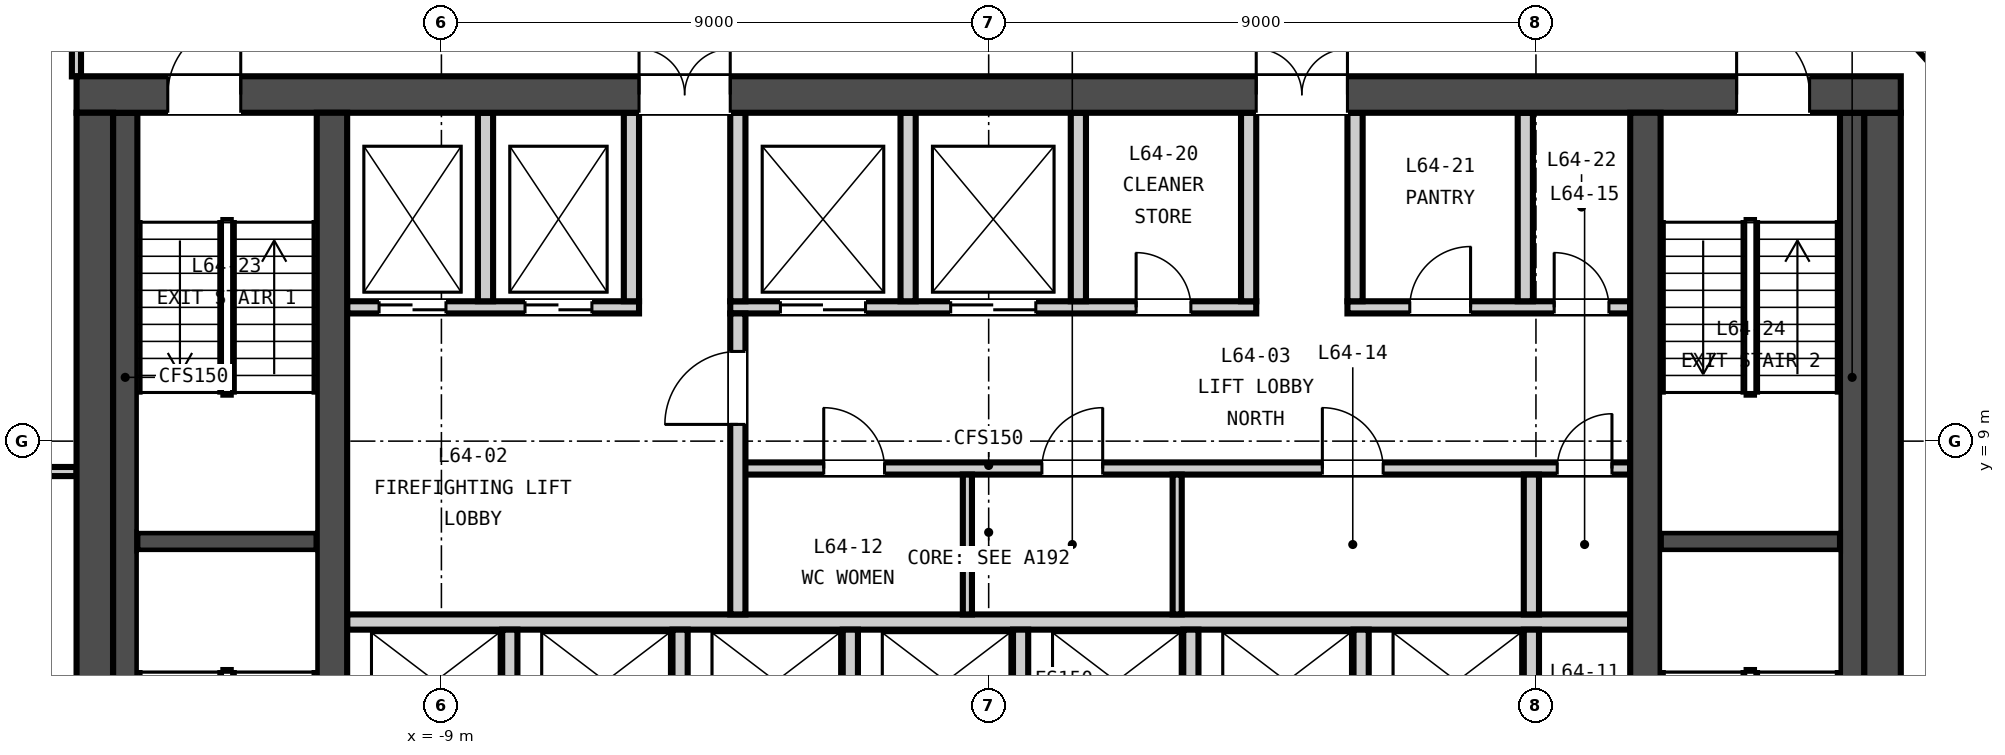
"""IFC4 building model, lengths in metres.
Left out: names, types, materials, properties, quantities, classifications, styles, units other than length and angle.
Written with IfcOpenShell. Run it as: python <this file> out.ifc"""

import sys

from ifc_helpers import new_model, si_unit, direction, frame, frame_2d, origin, place, context, subcontext, project, spatial, rectangle, extrude, element, fill, save


model = new_model("IFC4")
c1 = context("Model", 3, precision=1e-05, world=origin(), true_north=direction((0.0, 1.0)))
c2 = subcontext(c1, "Body", "Model", "MODEL_VIEW")
j1 = project(units=[si_unit("LENGTHUNIT", "METRE"), si_unit("PLANEANGLEUNIT", "RADIAN")], contexts=[c1])
p1 = place(None, origin())
s1 = spatial("IfcSite", under=j1, at=p1, CompositionType="ELEMENT")
p2 = place(p1, origin())
s2 = spatial("IfcBuilding", under=s1, at=p2, CompositionType="ELEMENT")
p3 = place(p2, frame((0.0, 0.0, 252.8)))
s3 = spatial("IfcBuildingStorey", under=s2, at=p3, CompositionType="ELEMENT", Elevation=252.8)
p4 = place(p3, frame((-15.0, 14.7, -0.15), z_axis=(0.0, 0.0, 1.0), x_axis=(1.0, 0.0, 0.0)))
e1 = element("IfcWall", 1, at=p4, inside=s3, PredefinedType="SOLIDWALL", context=c2, shape_type="SweptSolid", body=[
    extrude(rectangle(XDim=30.0, YDim=0.6, at=frame_2d((15.0, 0.0))), origin(), (0.0, 0.0, 1.0), 3.5),
])
p5 = place(p4, frame((9.25, 0.0, 0.15)))
e2 = element("IfcOpeningElement", 2, at=p5, cuts=e1, PredefinedType="OPENING", context=c2, shape_type="SweptSolid", body=[
    extrude(rectangle(XDim=1.5, YDim=2.1, at=frame_2d((0.75, 1.05))), frame((0.0, 0.31, 0.0), z_axis=(0.0, -1.0, 0.0), x_axis=(1.0, 0.0, 0.0)), (0.0, 0.0, 1.0), 0.62),
])
p6 = place(p4, frame((19.4, 0.0, 0.15)))
e3 = element("IfcOpeningElement", 3, at=p6, cuts=e1, PredefinedType="OPENING", context=c2, shape_type="SweptSolid", body=[
    extrude(rectangle(XDim=1.5, YDim=2.1, at=frame_2d((0.75, 1.05))), frame((0.0, 0.31, 0.0), z_axis=(0.0, -1.0, 0.0), x_axis=(1.0, 0.0, 0.0)), (0.0, 0.0, 1.0), 0.62),
])
p7 = place(p4, frame((1.5, 0.0, 0.15)))
e4 = element("IfcOpeningElement", 4, at=p7, cuts=e1, PredefinedType="OPENING", context=c2, shape_type="SweptSolid", body=[
    extrude(rectangle(XDim=1.2, YDim=2.1, at=frame_2d((0.6, 1.05))), frame((0.0, 0.31, 0.0), z_axis=(0.0, -1.0, 0.0), x_axis=(1.0, 0.0, 0.0)), (0.0, 0.0, 1.0), 0.62),
])
p8 = place(p4, frame((27.3, 0.0, 0.15)))
e5 = element("IfcOpeningElement", 5, at=p8, cuts=e1, PredefinedType="OPENING", context=c2, shape_type="SweptSolid", body=[
    extrude(rectangle(XDim=1.2, YDim=2.1, at=frame_2d((0.6, 1.05))), frame((0.0, 0.31, 0.0), z_axis=(0.0, -1.0, 0.0), x_axis=(1.0, 0.0, 0.0)), (0.0, 0.0, 1.0), 0.62),
])
for number, where, z_axis, x_axis in (
    (6, (-14.7, 0.6, -0.15), (0.0, 0.0, 1.0), (0.0, 1.0, 0.0)),
    (7, (14.7, 0.6, -0.15), (0.0, 0.0, 1.0), (0.0, 1.0, 0.0)),
):
    element("IfcWall", number, at=place(p3, frame(where, z_axis=z_axis, x_axis=x_axis)), inside=s3, PredefinedType="SOLIDWALL", context=c2, shape_type="SweptSolid", body=[
        extrude(rectangle(XDim=13.8, YDim=0.6, at=frame_2d((6.9, 0.0))), origin(), (0.0, 0.0, 1.0), 3.5),
    ])
for number, where, z_axis, x_axis in (
    (8, (-10.8, 0.6, -0.15), (0.0, 0.0, 1.0), (0.0, 1.0, 0.0)),
    (9, (10.8, 0.6, -0.15), (0.0, 0.0, 1.0), (0.0, 1.0, 0.0)),
):
    element("IfcWall", number, at=place(p3, frame(where, z_axis=z_axis, x_axis=x_axis)), inside=s3, PredefinedType="SOLIDWALL", context=c2, shape_type="SweptSolid", body=[
        extrude(rectangle(XDim=13.8, YDim=0.5, at=frame_2d((6.9, 0.0))), origin(), (0.0, 0.0, 1.0), 3.5),
    ])
p9 = place(p3, frame((-10.55, 6.025, 0.0), z_axis=(0.0, 0.0, 1.0), x_axis=(1.0, 0.0, 0.0)))
e10 = element("IfcWall", 10, at=p9, inside=s3, PredefinedType="PARTITIONING", context=c2, shape_type="SweptSolid", body=[
    extrude(rectangle(XDim=21.1, YDim=0.25, at=frame_2d((10.55, 0.0))), origin(), (0.0, 0.0, 1.0), 3.35),
])
p10 = place(p3, frame((-4.125, 8.55, 0.0), z_axis=(0.0, 0.0, 1.0), x_axis=(1.0, 0.0, 0.0)))
e11 = element("IfcWall", 11, at=p10, inside=s3, PredefinedType="PARTITIONING", context=c2, shape_type="SweptSolid", body=[
    extrude(rectangle(XDim=14.675, YDim=0.2, at=frame_2d((7.337, 0.0))), origin(), (0.0, 0.0, 1.0), 3.35),
])
p11 = place(p10, frame((1.413, 0.0, 0.0)))
e12 = element("IfcOpeningElement", 12, at=p11, cuts=e11, PredefinedType="OPENING", context=c2, shape_type="SweptSolid", body=[
    extrude(rectangle(XDim=1.0, YDim=2.1, at=frame_2d((0.5, 1.05))), frame((0.0, 0.11, 0.0), z_axis=(0.0, -1.0, 0.0), x_axis=(1.0, 0.0, 0.0)), (0.0, 0.0, 1.0), 0.22),
])
p12 = place(p10, frame((5.0, 0.0, 0.0)))
e13 = element("IfcOpeningElement", 13, at=p12, cuts=e11, PredefinedType="OPENING", context=c2, shape_type="SweptSolid", body=[
    extrude(rectangle(XDim=1.0, YDim=2.1, at=frame_2d((0.5, 1.05))), frame((0.0, 0.11, 0.0), z_axis=(0.0, -1.0, 0.0), x_axis=(1.0, 0.0, 0.0)), (0.0, 0.0, 1.0), 0.22),
])
p13 = place(p10, frame((9.613, 0.0, 0.0)))
e14 = element("IfcOpeningElement", 14, at=p13, cuts=e11, PredefinedType="OPENING", context=c2, shape_type="SweptSolid", body=[
    extrude(rectangle(XDim=1.0, YDim=2.1, at=frame_2d((0.5, 1.05))), frame((0.0, 0.11, 0.0), z_axis=(0.0, -1.0, 0.0), x_axis=(1.0, 0.0, 0.0)), (0.0, 0.0, 1.0), 0.22),
])
p14 = place(p10, frame((13.475, 0.0, 0.0)))
e15 = element("IfcOpeningElement", 15, at=p14, cuts=e11, PredefinedType="OPENING", context=c2, shape_type="SweptSolid", body=[
    extrude(rectangle(XDim=0.9, YDim=2.1, at=frame_2d((0.45, 1.05))), frame((0.0, 0.11, 0.0), z_axis=(0.0, -1.0, 0.0), x_axis=(1.0, 0.0, 0.0)), (0.0, 0.0, 1.0), 0.22),
])
p15 = place(p3, frame((-10.55, 11.2, 0.0), z_axis=(0.0, 0.0, 1.0), x_axis=(1.0, 0.0, 0.0)))
e16 = element("IfcWall", 16, at=p15, inside=s3, PredefinedType="PARTITIONING", context=c2, shape_type="SweptSolid", body=[
    extrude(rectangle(XDim=4.8, YDim=0.2, at=frame_2d((2.4, 0.0))), origin(), (0.0, 0.0, 1.0), 3.35),
])
p16 = place(p15, frame((0.525, 0.0, 0.0)))
e17 = element("IfcOpeningElement", 17, at=p16, cuts=e16, PredefinedType="OPENING", context=c2, shape_type="SweptSolid", body=[
    extrude(rectangle(XDim=1.1, YDim=2.1, at=frame_2d((0.55, 1.05))), frame((0.0, 0.11, 0.0), z_axis=(0.0, -1.0, 0.0), x_axis=(1.0, 0.0, 0.0)), (0.0, 0.0, 1.0), 0.22),
])
p17 = place(p15, frame((2.925, 0.0, 0.0)))
e18 = element("IfcOpeningElement", 18, at=p17, cuts=e16, PredefinedType="OPENING", context=c2, shape_type="SweptSolid", body=[
    extrude(rectangle(XDim=1.1, YDim=2.1, at=frame_2d((0.55, 1.05))), frame((0.0, 0.11, 0.0), z_axis=(0.0, -1.0, 0.0), x_axis=(1.0, 0.0, 0.0)), (0.0, 0.0, 1.0), 0.22),
])
p18 = place(p3, frame((-4.25, 11.2, 0.0), z_axis=(0.0, 0.0, 1.0), x_axis=(1.0, 0.0, 0.0)))
e19 = element("IfcWall", 19, at=p18, inside=s3, PredefinedType="PARTITIONING", context=c2, shape_type="SweptSolid", body=[
    extrude(rectangle(XDim=8.65, YDim=0.2, at=frame_2d((4.325, 0.0))), origin(), (0.0, 0.0, 1.0), 3.35),
])
p19 = place(p18, frame((0.825, 0.0, 0.0)))
e20 = element("IfcOpeningElement", 20, at=p19, cuts=e19, PredefinedType="OPENING", context=c2, shape_type="SweptSolid", body=[
    extrude(rectangle(XDim=1.4, YDim=2.1, at=frame_2d((0.7, 1.05))), frame((0.0, 0.11, 0.0), z_axis=(0.0, -1.0, 0.0), x_axis=(1.0, 0.0, 0.0)), (0.0, 0.0, 1.0), 0.22),
])
p20 = place(p18, frame((3.625, 0.0, 0.0)))
e21 = element("IfcOpeningElement", 21, at=p20, cuts=e19, PredefinedType="OPENING", context=c2, shape_type="SweptSolid", body=[
    extrude(rectangle(XDim=1.4, YDim=2.1, at=frame_2d((0.7, 1.05))), frame((0.0, 0.11, 0.0), z_axis=(0.0, -1.0, 0.0), x_axis=(1.0, 0.0, 0.0)), (0.0, 0.0, 1.0), 0.22),
])
p21 = place(p18, frame((6.675, 0.0, 0.0)))
e22 = element("IfcOpeningElement", 22, at=p21, cuts=e19, PredefinedType="OPENING", context=c2, shape_type="SweptSolid", body=[
    extrude(rectangle(XDim=0.9, YDim=2.1, at=frame_2d((0.45, 1.05))), frame((0.0, 0.11, 0.0), z_axis=(0.0, -1.0, 0.0), x_axis=(1.0, 0.0, 0.0)), (0.0, 0.0, 1.0), 0.22),
])
p22 = place(p3, frame((5.9, 11.2, 0.0), z_axis=(0.0, 0.0, 1.0), x_axis=(1.0, 0.0, 0.0)))
e23 = element("IfcWall", 23, at=p22, inside=s3, PredefinedType="PARTITIONING", context=c2, shape_type="SweptSolid", body=[
    extrude(rectangle(XDim=4.65, YDim=0.2, at=frame_2d((2.325, 0.0))), origin(), (0.0, 0.0, 1.0), 3.35),
])
p23 = place(p22, frame((1.025, 0.0, 0.0)))
e24 = element("IfcOpeningElement", 24, at=p23, cuts=e23, PredefinedType="OPENING", context=c2, shape_type="SweptSolid", body=[
    extrude(rectangle(XDim=1.0, YDim=2.1, at=frame_2d((0.5, 1.05))), frame((0.0, 0.11, 0.0), z_axis=(0.0, -1.0, 0.0), x_axis=(1.0, 0.0, 0.0)), (0.0, 0.0, 1.0), 0.22),
])
p24 = place(p22, frame((3.4, 0.0, 0.0)))
e25 = element("IfcOpeningElement", 25, at=p24, cuts=e23, PredefinedType="OPENING", context=c2, shape_type="SweptSolid", body=[
    extrude(rectangle(XDim=0.9, YDim=2.1, at=frame_2d((0.45, 1.05))), frame((0.0, 0.11, 0.0), z_axis=(0.0, -1.0, 0.0), x_axis=(1.0, 0.0, 0.0)), (0.0, 0.0, 1.0), 0.22),
])
p25 = place(p3, frame((-4.125, 6.15, 0.0), z_axis=(0.0, 0.0, 1.0), x_axis=(0.0, 1.0, 0.0)))
e26 = element("IfcWall", 26, at=p25, inside=s3, PredefinedType="PARTITIONING", context=c2, shape_type="SweptSolid", body=[
    extrude(rectangle(XDim=4.95, YDim=0.25, at=frame_2d((2.475, 0.0))), origin(), (0.0, 0.0, 1.0), 3.35),
])
p26 = place(p25, frame((3.125, 0.0, 0.0)))
e27 = element("IfcOpeningElement", 27, at=p26, cuts=e26, PredefinedType="OPENING", context=c2, shape_type="SweptSolid", body=[
    extrude(rectangle(XDim=1.2, YDim=2.1, at=frame_2d((0.6, 1.05))), frame((0.0, 0.135, 0.0), z_axis=(0.0, -1.0, 0.0), x_axis=(1.0, 0.0, 0.0)), (0.0, 0.0, 1.0), 0.27),
])
for number, where, z_axis, x_axis in (
    (28, (-7.875, 3.6, 0.0), (0.0, 0.0, 1.0), (0.0, 1.0, 0.0)),
    (29, (-5.075, 3.6, 0.0), (0.0, 0.0, 1.0), (0.0, 1.0, 0.0)),
    (30, (-2.275, 3.6, 0.0), (0.0, 0.0, 1.0), (0.0, 1.0, 0.0)),
    (31, (0.525, 3.6, 0.0), (0.0, 0.0, 1.0), (0.0, 1.0, 0.0)),
    (32, (3.325, 3.6, 0.0), (0.0, 0.0, 1.0), (0.0, 1.0, 0.0)),
    (33, (6.125, 3.6, 0.0), (0.0, 0.0, 1.0), (0.0, 1.0, 0.0)),
    (34, (8.925, 3.6, 0.0), (0.0, 0.0, 1.0), (0.0, 1.0, 0.0)),
):
    element("IfcWall", number, at=place(p3, frame(where, z_axis=z_axis, x_axis=x_axis)), inside=s3, PredefinedType="PARTITIONING", context=c2, shape_type="SweptSolid", body=[
        extrude(rectangle(XDim=2.3, YDim=0.25, at=frame_2d((1.15, 0.0))), origin(), (0.0, 0.0, 1.0), 3.35),
    ])
for number, where, z_axis, x_axis in (
    (35, (-0.35, 6.15, 0.0), (0.0, 0.0, 1.0), (0.0, 1.0, 0.0)),
    (36, (3.1, 6.15, 0.0), (0.0, 0.0, 1.0), (0.0, 1.0, 0.0)),
):
    element("IfcWall", number, at=place(p3, frame(where, z_axis=z_axis, x_axis=x_axis)), inside=s3, PredefinedType="PARTITIONING", context=c2, shape_type="SweptSolid", body=[
        extrude(rectangle(XDim=2.3, YDim=0.15, at=frame_2d((1.15, 0.0))), origin(), (0.0, 0.0, 1.0), 3.35),
    ])
p27 = place(p3, frame((8.925, 6.15, 0.0), z_axis=(0.0, 0.0, 1.0), x_axis=(0.0, 1.0, 0.0)))
e37 = element("IfcWall", 37, at=p27, inside=s3, PredefinedType="PARTITIONING", context=c2, shape_type="SweptSolid", body=[
    extrude(rectangle(XDim=2.3, YDim=0.25, at=frame_2d((1.15, 0.0))), origin(), (0.0, 0.0, 1.0), 3.35),
])
for number, where, z_axis, x_axis in (
    (38, (-8.275, 11.3, 0.0), (0.0, 0.0, 1.0), (0.0, 1.0, 0.0)),
    (39, (-5.875, 11.3, 0.0), (0.0, 0.0, 1.0), (0.0, 1.0, 0.0)),
    (40, (-4.125, 11.3, 0.0), (0.0, 0.0, 1.0), (0.0, 1.0, 0.0)),
    (41, (-1.325, 11.3, 0.0), (0.0, 0.0, 1.0), (0.0, 1.0, 0.0)),
    (42, (1.475, 11.3, 0.0), (0.0, 0.0, 1.0), (0.0, 1.0, 0.0)),
    (43, (4.275, 11.3, 0.0), (0.0, 0.0, 1.0), (0.0, 1.0, 0.0)),
    (44, (6.025, 11.3, 0.0), (0.0, 0.0, 1.0), (0.0, 1.0, 0.0)),
    (45, (8.825, 11.3, 0.0), (0.0, 0.0, 1.0), (0.0, 1.0, 0.0)),
):
    element("IfcWall", number, at=place(p3, frame(where, z_axis=z_axis, x_axis=x_axis)), inside=s3, PredefinedType="PARTITIONING", context=c2, shape_type="SweptSolid", body=[
        extrude(rectangle(XDim=3.1, YDim=0.25, at=frame_2d((1.55, 0.0))), origin(), (0.0, 0.0, 1.0), 3.35),
    ])
p28 = place(p3, frame((-14.0, 7.35, 0.0), z_axis=(0.0, 0.0, 1.0), x_axis=(1.0, 0.0, 0.0)))
e46 = element("IfcWall", 46, at=p28, inside=s3, PredefinedType="SOLIDWALL", context=c2, shape_type="SweptSolid", body=[
    extrude(rectangle(XDim=2.95, YDim=0.3, at=frame_2d((1.475, 0.0))), origin(), (0.0, 0.0, 1.0), 3.35),
])
p29 = place(p3, frame((-14.2, 0.6, 0.0), z_axis=(0.0, 0.0, 1.0), x_axis=(0.0, 1.0, 0.0)))
e47 = element("IfcWall", 47, at=p29, inside=s3, PredefinedType="SOLIDWALL", context=c2, shape_type="SweptSolid", body=[
    extrude(rectangle(XDim=13.8, YDim=0.4, at=frame_2d((6.9, 0.0))), origin(), (0.0, 0.0, 1.0), 3.35),
])
p30 = place(p3, frame((11.05, 7.35, 0.0), z_axis=(0.0, 0.0, 1.0), x_axis=(1.0, 0.0, 0.0)))
e48 = element("IfcWall", 48, at=p30, inside=s3, PredefinedType="SOLIDWALL", context=c2, shape_type="SweptSolid", body=[
    extrude(rectangle(XDim=2.95, YDim=0.3, at=frame_2d((1.475, 0.0))), origin(), (0.0, 0.0, 1.0), 3.35),
])
p31 = place(p3, frame((14.2, 0.6, 0.0), z_axis=(0.0, 0.0, 1.0), x_axis=(0.0, 1.0, 0.0)))
e49 = element("IfcWall", 49, at=p31, inside=s3, PredefinedType="SOLIDWALL", context=c2, shape_type="SweptSolid", body=[
    extrude(rectangle(XDim=13.8, YDim=0.4, at=frame_2d((6.9, 0.0))), origin(), (0.0, 0.0, 1.0), 3.35),
])
p32 = place(p3, frame((-15.002, 14.998, 0.0), z_axis=(0.0, 0.0, 1.0), x_axis=(0.000965483499, 0.999999533921, 0.0)))
e50 = element("IfcWall", 50, at=p32, inside=s3, PredefinedType="PARTITIONING", context=c2, shape_type="SweptSolid", body=[
    extrude(rectangle(XDim=2.023, YDim=0.15, at=frame_2d((1.011, 0.0))), origin(), (0.0, 0.0, 1.0), 2.601),
])
p33 = place(p3, frame((-17.125, 8.5, 0.0), z_axis=(0.0, 0.0, 1.0), x_axis=(1.0, 0.0, 0.0)))
e51 = element("IfcWall", 51, at=p33, inside=s3, PredefinedType="PARTITIONING", context=c2, shape_type="SweptSolid", body=[
    extrude(rectangle(XDim=2.125, YDim=0.15, at=frame_2d((1.062, 0.0))), origin(), (0.0, 0.0, 1.0), 2.601),
])
p34 = place(p3, frame((14.476, 16.433, 0.0), z_axis=(0.0, 0.0, 1.0), x_axis=(0.669204384193, -0.743078388985, 0.0)))
e52 = element("IfcWall", 52, at=p34, inside=s3, PredefinedType="PARTITIONING", context=c2, shape_type="SweptSolid", body=[
    extrude(rectangle(XDim=3.996, YDim=0.15, at=frame_2d((1.998, 0.0))), origin(), (0.0, 0.0, 1.0), 2.601),
])
p35 = place(p26, origin())
e53 = element("IfcDoor", 53, at=p35, inside=s3, OperationType="SINGLE_SWING_LEFT", PredefinedType="DOOR", context=c2, shape_type="SweptSolid", body=[
    extrude(rectangle(XDim=1.2, YDim=2.1, at=frame_2d((0.6, 1.05))), frame((0.0, 0.025, 0.0), z_axis=(0.0, -1.0, 0.0), x_axis=(1.0, 0.0, 0.0)), (0.0, 0.0, 1.0), 0.05),
])
fill(e27, e53)
p36 = place(p11, origin())
e54 = element("IfcDoor", 54, at=p36, inside=s3, OperationType="SINGLE_SWING_LEFT", PredefinedType="DOOR", context=c2, shape_type="SweptSolid", body=[
    extrude(rectangle(XDim=1.0, YDim=2.1, at=frame_2d((0.5, 1.05))), frame((0.0, 0.025, 0.0), z_axis=(0.0, -1.0, 0.0), x_axis=(1.0, 0.0, 0.0)), (0.0, 0.0, 1.0), 0.05),
])
fill(e12, e54)
p37 = place(p12, origin())
e55 = element("IfcDoor", 55, at=p37, inside=s3, OperationType="SINGLE_SWING_RIGHT", PredefinedType="DOOR", context=c2, shape_type="SweptSolid", body=[
    extrude(rectangle(XDim=1.0, YDim=2.1, at=frame_2d((0.5, 1.05))), frame((0.0, 0.025, 0.0), z_axis=(0.0, -1.0, 0.0), x_axis=(1.0, 0.0, 0.0)), (0.0, 0.0, 1.0), 0.05),
])
fill(e13, e55)
p38 = place(p13, origin())
e56 = element("IfcDoor", 56, at=p38, inside=s3, OperationType="SINGLE_SWING_LEFT", PredefinedType="DOOR", context=c2, shape_type="SweptSolid", body=[
    extrude(rectangle(XDim=1.0, YDim=2.1, at=frame_2d((0.5, 1.05))), frame((0.0, 0.025, 0.0), z_axis=(0.0, -1.0, 0.0), x_axis=(1.0, 0.0, 0.0)), (0.0, 0.0, 1.0), 0.05),
])
fill(e14, e56)
p39 = place(p14, origin())
e57 = element("IfcDoor", 57, at=p39, inside=s3, OperationType="SINGLE_SWING_RIGHT", PredefinedType="DOOR", context=c2, shape_type="SweptSolid", body=[
    extrude(rectangle(XDim=0.9, YDim=2.1, at=frame_2d((0.45, 1.05))), frame((0.0, 0.025, 0.0), z_axis=(0.0, -1.0, 0.0), x_axis=(1.0, 0.0, 0.0)), (0.0, 0.0, 1.0), 0.05),
])
fill(e15, e57)
p40 = place(p16, origin())
e58 = element("IfcDoor", 58, at=p40, inside=s3, OperationType="DOUBLE_DOOR_SLIDING", PredefinedType="DOOR", context=c2, shape_type="SweptSolid", body=[
    extrude(rectangle(XDim=1.1, YDim=2.1, at=frame_2d((0.55, 1.05))), frame((0.0, 0.025, 0.0), z_axis=(0.0, -1.0, 0.0), x_axis=(1.0, 0.0, 0.0)), (0.0, 0.0, 1.0), 0.05),
])
fill(e17, e58)
p41 = place(p17, origin())
e59 = element("IfcDoor", 59, at=p41, inside=s3, OperationType="DOUBLE_DOOR_SLIDING", PredefinedType="DOOR", context=c2, shape_type="SweptSolid", body=[
    extrude(rectangle(XDim=1.1, YDim=2.1, at=frame_2d((0.55, 1.05))), frame((0.0, 0.025, 0.0), z_axis=(0.0, -1.0, 0.0), x_axis=(1.0, 0.0, 0.0)), (0.0, 0.0, 1.0), 0.05),
])
fill(e18, e59)
p42 = place(p19, origin())
e60 = element("IfcDoor", 60, at=p42, inside=s3, OperationType="DOUBLE_DOOR_SLIDING", PredefinedType="DOOR", context=c2, shape_type="SweptSolid", body=[
    extrude(rectangle(XDim=1.4, YDim=2.1, at=frame_2d((0.7, 1.05))), frame((0.0, 0.025, 0.0), z_axis=(0.0, -1.0, 0.0), x_axis=(1.0, 0.0, 0.0)), (0.0, 0.0, 1.0), 0.05),
])
fill(e20, e60)
p43 = place(p20, origin())
e61 = element("IfcDoor", 61, at=p43, inside=s3, OperationType="DOUBLE_DOOR_SLIDING", PredefinedType="DOOR", context=c2, shape_type="SweptSolid", body=[
    extrude(rectangle(XDim=1.4, YDim=2.1, at=frame_2d((0.7, 1.05))), frame((0.0, 0.025, 0.0), z_axis=(0.0, -1.0, 0.0), x_axis=(1.0, 0.0, 0.0)), (0.0, 0.0, 1.0), 0.05),
])
fill(e21, e61)
p44 = place(p21, origin())
e62 = element("IfcDoor", 62, at=p44, inside=s3, OperationType="SINGLE_SWING_LEFT", PredefinedType="DOOR", context=c2, shape_type="SweptSolid", body=[
    extrude(rectangle(XDim=0.9, YDim=2.1, at=frame_2d((0.45, 1.05))), frame((0.0, 0.025, 0.0), z_axis=(0.0, -1.0, 0.0), x_axis=(1.0, 0.0, 0.0)), (0.0, 0.0, 1.0), 0.05),
])
fill(e22, e62)
p45 = place(p23, origin())
e63 = element("IfcDoor", 63, at=p45, inside=s3, OperationType="SINGLE_SWING_RIGHT", PredefinedType="DOOR", context=c2, shape_type="SweptSolid", body=[
    extrude(rectangle(XDim=1.0, YDim=2.1, at=frame_2d((0.5, 1.05))), frame((0.0, 0.025, 0.0), z_axis=(0.0, -1.0, 0.0), x_axis=(1.0, 0.0, 0.0)), (0.0, 0.0, 1.0), 0.05),
])
fill(e24, e63)
p46 = place(p24, origin())
e64 = element("IfcDoor", 64, at=p46, inside=s3, OperationType="SINGLE_SWING_LEFT", PredefinedType="DOOR", context=c2, shape_type="SweptSolid", body=[
    extrude(rectangle(XDim=0.9, YDim=2.1, at=frame_2d((0.45, 1.05))), frame((0.0, 0.025, 0.0), z_axis=(0.0, -1.0, 0.0), x_axis=(1.0, 0.0, 0.0)), (0.0, 0.0, 1.0), 0.05),
])
fill(e25, e64)
p47 = place(p5, origin())
e65 = element("IfcDoor", 65, at=p47, inside=s3, OperationType="DOUBLE_DOOR_SINGLE_SWING", PredefinedType="DOOR", context=c2, shape_type="SweptSolid", body=[
    extrude(rectangle(XDim=1.5, YDim=2.1, at=frame_2d((0.75, 1.05))), frame((0.0, 0.025, 0.0), z_axis=(0.0, -1.0, 0.0), x_axis=(1.0, 0.0, 0.0)), (0.0, 0.0, 1.0), 0.05),
])
fill(e2, e65)
p48 = place(p6, origin())
e66 = element("IfcDoor", 66, at=p48, inside=s3, OperationType="DOUBLE_DOOR_SINGLE_SWING", PredefinedType="DOOR", context=c2, shape_type="SweptSolid", body=[
    extrude(rectangle(XDim=1.5, YDim=2.1, at=frame_2d((0.75, 1.05))), frame((0.0, 0.025, 0.0), z_axis=(0.0, -1.0, 0.0), x_axis=(1.0, 0.0, 0.0)), (0.0, 0.0, 1.0), 0.05),
])
fill(e3, e66)
p49 = place(p7, origin())
e67 = element("IfcDoor", 67, at=p49, inside=s3, OperationType="SINGLE_SWING_RIGHT", PredefinedType="DOOR", context=c2, shape_type="SweptSolid", body=[
    extrude(rectangle(XDim=1.2, YDim=2.1, at=frame_2d((0.6, 1.05))), frame((0.0, 0.025, 0.0), z_axis=(0.0, -1.0, 0.0), x_axis=(1.0, 0.0, 0.0)), (0.0, 0.0, 1.0), 0.05),
])
fill(e4, e67)
p50 = place(p8, origin())
e68 = element("IfcDoor", 68, at=p50, inside=s3, OperationType="SINGLE_SWING_LEFT", PredefinedType="DOOR", context=c2, shape_type="SweptSolid", body=[
    extrude(rectangle(XDim=1.2, YDim=2.1, at=frame_2d((0.6, 1.05))), frame((0.0, 0.025, 0.0), z_axis=(0.0, -1.0, 0.0), x_axis=(1.0, 0.0, 0.0)), (0.0, 0.0, 1.0), 0.05),
])
fill(e5, e68)
save(model, sys.argv[1])
